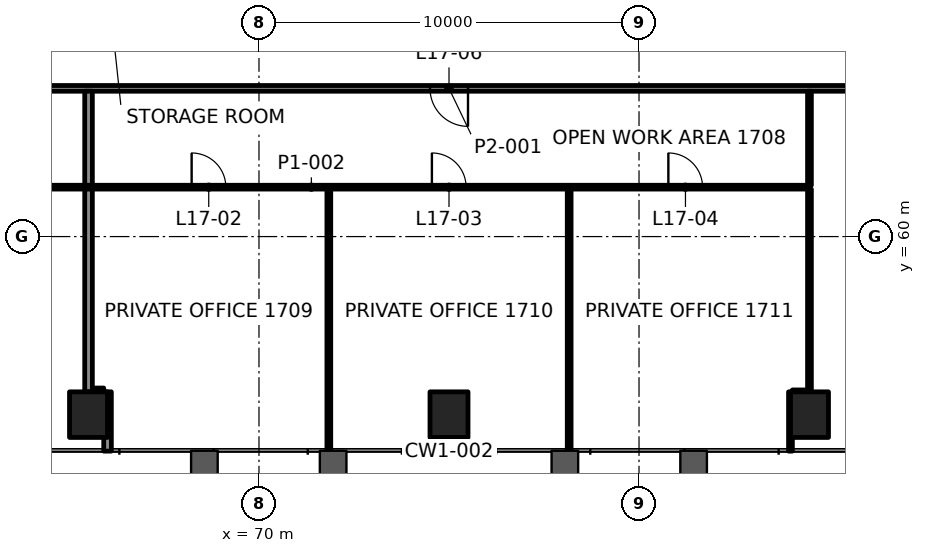
"""IFC4 building model, lengths in metres.
Left out: names, types, materials, properties, quantities, classifications, styles, units other than length and angle.
Written with IfcOpenShell. Run it as: python <this file> out.ifc"""

import sys

from ifc_helpers import new_model, si_unit, direction, frame, frame_2d, origin, origin_2d, place, context, subcontext, project, spatial, rectangle, extrude, element, fill, save


model = new_model("IFC4")
c1 = context("Model", 3, precision=1e-05, world=origin(), true_north=direction((0.0, 1.0)))
c2 = subcontext(c1, "Body", "Model", "MODEL_VIEW")
j1 = project(units=[si_unit("LENGTHUNIT", "METRE"), si_unit("PLANEANGLEUNIT", "RADIAN")], contexts=[c1])
p1 = place(None, origin())
s1 = spatial("IfcSite", under=j1, at=p1, CompositionType="ELEMENT")
p2 = place(p1, origin())
s2 = spatial("IfcBuilding", under=s1, at=p2, CompositionType="ELEMENT")
p3 = place(p2, frame((0.0, 0.0, 77.8)))
s3 = spatial("IfcBuildingStorey", under=s2, at=p3, CompositionType="ELEMENT", Elevation=77.8)
for number, where, z_axis, x_axis in (
    (1, (65.515, 55.314, -0.0), (0.0, 0.0, 1.0), (1.0, 0.0, 0.0)),
    (2, (75.0, 55.314, -0.0), (0.0, 0.0, 1.0), (1.0, 0.0, 0.0)),
    (3, (84.485, 55.314, -0.0), (0.0, 0.0, 1.0), (1.0, 0.0, 0.0)),
):
    element("IfcColumn", number, at=place(p3, frame(where, z_axis=z_axis, x_axis=x_axis)), inside=s3, PredefinedType="COLUMN", context=c2, shape_type="SweptSolid", body=[
        extrude(rectangle(XDim=1.0, YDim=1.2, at=origin_2d()), origin(), (0.0, 0.0, 1.0), 4.2),
    ])
p4 = place(p3, frame((65.625, 55.914, 0.0), z_axis=(0.0, 0.0, 1.0), x_axis=(1.0, 0.0, 0.0)))
e4 = element("IfcWall", 4, at=p4, inside=s3, PredefinedType="PARTITIONING", context=c2, shape_type="SweptSolid", body=[
    extrude(rectangle(XDim=0.29, YDim=0.2, at=frame_2d((0.145, 0.0))), origin(), (0.0, 0.0, 1.0), 3.4),
])
p5 = place(p3, frame((84.036, 55.914, 0.0), z_axis=(0.0, 0.0, 1.0), x_axis=(1.0, 0.0, 0.0)))
e5 = element("IfcWall", 5, at=p5, inside=s3, PredefinedType="PARTITIONING", context=c2, shape_type="SweptSolid", body=[
    extrude(rectangle(XDim=0.399, YDim=0.1, at=frame_2d((0.199, 0.0))), origin(), (0.0, 0.0, 1.0), 3.4),
])
p6 = place(p3, frame((58.271, 61.3, 0.0), z_axis=(0.0, 0.0, 1.0), x_axis=(1.0, 0.0, 0.0)))
e6 = element("IfcWall", 6, at=p6, inside=s3, PredefinedType="PARTITIONING", context=c2, shape_type="SweptSolid", body=[
    extrude(rectangle(XDim=26.214, YDim=0.1, at=frame_2d((13.107, 0.0))), origin(), (0.0, 0.0, 1.0), 3.4),
])
p7 = place(p6, frame((3.122, 0.0, 0.0)))
e7 = element("IfcOpeningElement", 7, at=p7, cuts=e6, PredefinedType="OPENING", context=c2, shape_type="SweptSolid", body=[
    extrude(rectangle(XDim=1.2, YDim=2.1, at=frame_2d((0.6, 1.05))), frame((0.0, 0.06, 0.0), z_axis=(0.0, -1.0, 0.0), x_axis=(1.0, 0.0, 0.0)), (0.0, 0.0, 1.0), 0.12),
])
p8 = place(p6, frame((9.957, 0.0, 0.0)))
e8 = element("IfcOpeningElement", 8, at=p8, cuts=e6, PredefinedType="OPENING", context=c2, shape_type="SweptSolid", body=[
    extrude(rectangle(XDim=0.9, YDim=2.1, at=frame_2d((0.45, 1.05))), frame((0.0, 0.06, 0.0), z_axis=(0.0, -1.0, 0.0), x_axis=(1.0, 0.0, 0.0)), (0.0, 0.0, 1.0), 0.12),
])
p9 = place(p6, frame((16.279, 0.0, 0.0)))
e9 = element("IfcOpeningElement", 9, at=p9, cuts=e6, PredefinedType="OPENING", context=c2, shape_type="SweptSolid", body=[
    extrude(rectangle(XDim=0.9, YDim=2.1, at=frame_2d((0.45, 1.05))), frame((0.0, 0.06, 0.0), z_axis=(0.0, -1.0, 0.0), x_axis=(1.0, 0.0, 0.0)), (0.0, 0.0, 1.0), 0.12),
])
p10 = place(p6, frame((22.501, 0.0, 0.0)))
e10 = element("IfcOpeningElement", 10, at=p10, cuts=e6, PredefinedType="OPENING", context=c2, shape_type="SweptSolid", body=[
    extrude(rectangle(XDim=0.9, YDim=2.1, at=frame_2d((0.45, 1.05))), frame((0.0, 0.06, 0.0), z_axis=(0.0, -1.0, 0.0), x_axis=(1.0, 0.0, 0.0)), (0.0, 0.0, 1.0), 0.12),
])
p11 = place(p3, frame((90.099, 63.9, 0.0), z_axis=(0.0, 0.0, 1.0), x_axis=(-1.0, 0.0, 0.0)))
e11 = element("IfcWall", 11, at=p11, inside=s3, PredefinedType="PARTITIONING", context=c2, shape_type="SweptSolid", body=[
    extrude(rectangle(XDim=30.199, YDim=0.15, at=frame_2d((15.1, 0.0))), origin(), (0.0, 0.0, 1.0), 3.4),
])
p12 = place(p11, frame((2.309, 0.0, 0.0)))
e12 = element("IfcOpeningElement", 12, at=p12, cuts=e11, PredefinedType="OPENING", context=c2, shape_type="SweptSolid", body=[
    extrude(rectangle(XDim=1.2, YDim=2.1, at=frame_2d((0.6, 1.05))), frame((0.0, 0.085, 0.0), z_axis=(0.0, -1.0, 0.0), x_axis=(1.0, 0.0, 0.0)), (0.0, 0.0, 1.0), 0.17),
])
p13 = place(p11, frame((14.599, 0.0, 0.0)))
e13 = element("IfcOpeningElement", 13, at=p13, cuts=e11, PredefinedType="OPENING", context=c2, shape_type="SweptSolid", body=[
    extrude(rectangle(XDim=1.0, YDim=2.1, at=frame_2d((0.5, 1.05))), frame((0.0, 0.085, 0.0), z_axis=(0.0, -1.0, 0.0), x_axis=(1.0, 0.0, 0.0)), (0.0, 0.0, 1.0), 0.17),
])
p14 = place(p11, frame((26.791, 0.0, 0.0)))
e14 = element("IfcOpeningElement", 14, at=p14, cuts=e11, PredefinedType="OPENING", context=c2, shape_type="SweptSolid", body=[
    extrude(rectangle(XDim=1.0, YDim=2.1, at=frame_2d((0.5, 1.05))), frame((0.0, 0.085, 0.0), z_axis=(0.0, -1.0, 0.0), x_axis=(1.0, 0.0, 0.0)), (0.0, 0.0, 1.0), 0.17),
])
p15 = place(p3, frame((84.485, 55.915, 0.0), z_axis=(0.0, 0.0, 1.0), x_axis=(0.0, 1.0, 0.0)))
e15 = element("IfcWall", 15, at=p15, inside=s3, PredefinedType="PARTITIONING", context=c2, shape_type="SweptSolid", body=[
    extrude(rectangle(XDim=5.335, YDim=0.1, at=frame_2d((2.668, 0.0))), origin(), (0.0, 0.0, 1.0), 3.4),
])
p16 = place(p3, frame((83.985, 54.354, 0.0), z_axis=(0.0, 0.0, 1.0), x_axis=(0.0, 1.0, 0.0)))
e16 = element("IfcWall", 16, at=p16, inside=s3, PredefinedType="PARTITIONING", context=c2, shape_type="SweptSolid", body=[
    extrude(rectangle(XDim=1.56, YDim=0.1, at=frame_2d((0.78, 0.0))), origin(), (0.0, 0.0, 1.0), 3.165),
])
for number, where, z_axis, x_axis in (
    (17, (78.162, 54.354, 0.0), (0.0, 0.0, 1.0), (0.0, 1.0, 0.0)),
    (18, (71.838, 54.354, 0.0), (0.0, 0.0, 1.0), (0.0, 1.0, 0.0)),
):
    element("IfcWall", number, at=place(p3, frame(where, z_axis=z_axis, x_axis=x_axis)), inside=s3, PredefinedType="PARTITIONING", context=c2, shape_type="SweptSolid", body=[
        extrude(rectangle(XDim=6.896, YDim=0.1, at=frame_2d((3.448, 0.0))), origin(), (0.0, 0.0, 1.0), 3.165),
    ])
p17 = place(p3, frame((66.015, 54.354, 0.0), z_axis=(0.0, 0.0, 1.0), x_axis=(0.0, 1.0, 0.0)))
e19 = element("IfcWall", 19, at=p17, inside=s3, PredefinedType="PARTITIONING", context=c2, shape_type="SweptSolid", body=[
    extrude(rectangle(XDim=1.56, YDim=0.2, at=frame_2d((0.78, 0.0))), origin(), (0.0, 0.0, 1.0), 3.165),
])
p18 = place(p3, frame((65.515, 55.914, 0.0), z_axis=(0.0, 0.0, 1.0), x_axis=(0.0, 1.0, 0.0)))
e20 = element("IfcWall", 20, at=p18, inside=s3, PredefinedType="PARTITIONING", context=c2, shape_type="SweptSolid", body=[
    extrude(rectangle(XDim=5.336, YDim=0.2, at=frame_2d((2.668, 0.0))), origin(), (0.0, 0.0, 1.0), 3.4),
])
p19 = place(p3, frame((84.485, 61.35, 0.0), z_axis=(0.0, 0.0, 1.0), x_axis=(0.0, 1.0, 0.0)))
e21 = element("IfcWall", 21, at=p19, inside=s3, PredefinedType="PARTITIONING", context=c2, shape_type="SweptSolid", body=[
    extrude(rectangle(XDim=2.475, YDim=0.1, at=frame_2d((1.237, 0.0))), origin(), (0.0, 0.0, 1.0), 3.4),
])
p20 = place(p3, frame((65.515, 61.35, 0.0), z_axis=(0.0, 0.0, 1.0), x_axis=(0.0, 1.0, 0.0)))
e22 = element("IfcWall", 22, at=p20, inside=s3, PredefinedType="PARTITIONING", context=c2, shape_type="SweptSolid", body=[
    extrude(rectangle(XDim=2.475, YDim=0.2, at=frame_2d((1.237, 0.0))), origin(), (0.0, 0.0, 1.0), 3.4),
])
p21 = place(p8, origin())
e23 = element("IfcDoor", 23, at=p21, inside=s3, OperationType="SINGLE_SWING_RIGHT", PredefinedType="DOOR", context=c2, shape_type="SweptSolid", body=[
    extrude(rectangle(XDim=0.9, YDim=2.1, at=frame_2d((0.45, 1.05))), frame((0.0, 0.025, 0.0), z_axis=(0.0, -1.0, 0.0), x_axis=(1.0, 0.0, 0.0)), (0.0, 0.0, 1.0), 0.05),
])
fill(e8, e23)
p22 = place(p9, origin())
e24 = element("IfcDoor", 24, at=p22, inside=s3, OperationType="SINGLE_SWING_LEFT", PredefinedType="DOOR", context=c2, shape_type="SweptSolid", body=[
    extrude(rectangle(XDim=0.9, YDim=2.1, at=frame_2d((0.45, 1.05))), frame((0.0, 0.025, 0.0), z_axis=(0.0, -1.0, 0.0), x_axis=(1.0, 0.0, 0.0)), (0.0, 0.0, 1.0), 0.05),
])
fill(e9, e24)
p23 = place(p10, origin())
e25 = element("IfcDoor", 25, at=p23, inside=s3, OperationType="SINGLE_SWING_RIGHT", PredefinedType="DOOR", context=c2, shape_type="SweptSolid", body=[
    extrude(rectangle(XDim=0.9, YDim=2.1, at=frame_2d((0.45, 1.05))), frame((0.0, 0.025, 0.0), z_axis=(0.0, -1.0, 0.0), x_axis=(1.0, 0.0, 0.0)), (0.0, 0.0, 1.0), 0.05),
])
fill(e10, e25)
p24 = place(p13, origin())
e26 = element("IfcDoor", 26, at=p24, inside=s3, OperationType="SINGLE_SWING_RIGHT", PredefinedType="DOOR", context=c2, shape_type="SweptSolid", body=[
    extrude(rectangle(XDim=1.0, YDim=2.1, at=frame_2d((0.5, 1.05))), frame((0.0, 0.025, 0.0), z_axis=(0.0, -1.0, 0.0), x_axis=(1.0, 0.0, 0.0)), (0.0, 0.0, 1.0), 0.05),
])
fill(e13, e26)
save(model, sys.argv[1])
